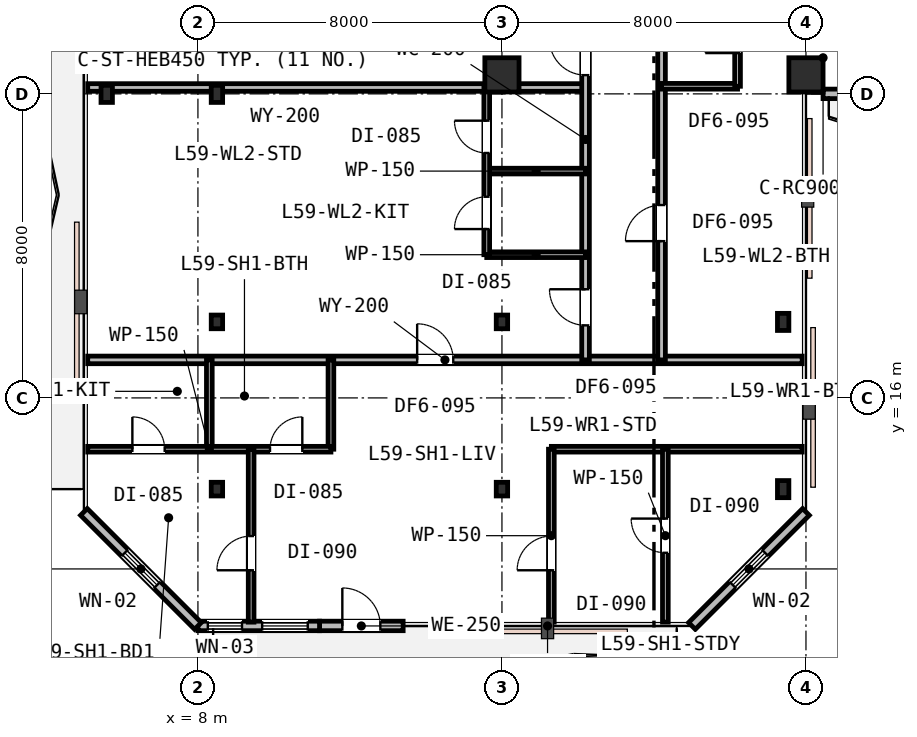
"""IFC4 building model, lengths in metres.
Left out: names, types, materials, properties, quantities, classifications, styles, units other than length and angle.
Written with IfcOpenShell. Run it as: python <this file> out.ifc"""

import sys

from ifc_helpers import new_model, si_unit, direction, frame, frame_2d, origin, origin_2d, place, context, subcontext, project, spatial, rectangle, i_section, extrude, element, fill, save


model = new_model("IFC4")
c1 = context("Model", 3, precision=1e-05, world=origin(), true_north=direction((0.0, 1.0)))
c2 = subcontext(c1, "Body", "Model", "MODEL_VIEW")
j1 = project(units=[si_unit("LENGTHUNIT", "METRE"), si_unit("PLANEANGLEUNIT", "RADIAN")], contexts=[c1])
p1 = place(None, origin())
s1 = spatial("IfcSite", under=j1, at=p1, CompositionType="ELEMENT")
p2 = place(p1, origin())
s2 = spatial("IfcBuilding", under=s1, at=p2, CompositionType="ELEMENT")
p3 = place(p2, frame((0.0, 0.0, 229.8)))
s3 = spatial("IfcBuildingStorey", under=s2, at=p3, CompositionType="ELEMENT", Elevation=229.8)
p4 = place(p3, frame((8.5, 24.0, 0.0), z_axis=(0.0, 0.0, 1.0), x_axis=(1.0, 0.0, 0.0)))
e1 = element("IfcColumn", 1, at=p4, inside=s3, PredefinedType="COLUMN", context=c2, shape_type="SweptSolid", body=[
    extrude(i_section(OverallWidth=0.3, OverallDepth=0.45, WebThickness=0.014, FlangeThickness=0.026, FilletRadius=0.027, at=origin_2d()), origin(), (0.0, 0.0, 1.0), 3.8),
])
for number, where, z_axis, x_axis in (
    (2, (16.0, 24.5, 0.0), (0.0, 0.0, 1.0), (1.0, 0.0, 0.0)),
    (3, (24.0, 24.5, 0.0), (0.0, 0.0, 1.0), (1.0, 0.0, 0.0)),
):
    element("IfcColumn", number, at=place(p3, frame(where, z_axis=z_axis, x_axis=x_axis)), inside=s3, PredefinedType="COLUMN", context=c2, shape_type="SweptSolid", body=[
        extrude(rectangle(XDim=0.9, YDim=0.9, at=origin_2d()), origin(), (0.0, 0.0, 1.0), 3.8),
    ])
for number, where, z_axis, x_axis in (
    (4, (5.6, 24.0, 0.0), (0.0, 0.0, 1.0), (1.0, 0.0, 0.0)),
    (5, (23.4, 13.6, 0.0), (0.0, 0.0, 1.0), (1.0, 0.0, 0.0)),
    (6, (23.4, 18.0, 0.0), (0.0, 0.0, 1.0), (1.0, 0.0, 0.0)),
):
    element("IfcColumn", number, at=place(p3, frame(where, z_axis=z_axis, x_axis=x_axis)), inside=s3, PredefinedType="COLUMN", context=c2, shape_type="SweptSolid", body=[
        extrude(i_section(OverallWidth=0.3, OverallDepth=0.45, WebThickness=0.014, FlangeThickness=0.026, FilletRadius=0.027, at=origin_2d()), origin(), (0.0, 0.0, 1.0), 3.8),
    ])
for number, where, z_axis, x_axis in (
    (7, (8.5, 13.6, 0.0), (0.0, 0.0, 1.0), (1.0, 0.0, 0.0)),
    (8, (16.0, 13.6, 0.0), (0.0, 0.0, 1.0), (1.0, 0.0, 0.0)),
    (9, (8.5, 18.0, 0.0), (0.0, 0.0, 1.0), (1.0, 0.0, 0.0)),
    (10, (16.0, 18.0, 0.0), (0.0, 0.0, 1.0), (1.0, 0.0, 0.0)),
):
    element("IfcColumn", number, at=place(p3, frame(where, z_axis=z_axis, x_axis=x_axis)), inside=s3, PredefinedType="COLUMN", context=c2, shape_type="SweptSolid", body=[
        extrude(i_section(OverallWidth=0.3, OverallDepth=0.36, WebThickness=0.013, FlangeThickness=0.022, FilletRadius=0.027, at=origin_2d()), origin(), (0.0, 0.0, 1.0), 3.8),
    ])
p5 = place(p3, frame((11.2, 10.0, 0.0), z_axis=(0.0, 0.0, 1.0), x_axis=(1.0, 0.0, 0.0)))
e11 = element("IfcWall", 11, at=p5, inside=s3, PredefinedType="STANDARD", context=c2, shape_type="SweptSolid", body=[
    extrude(rectangle(XDim=2.2, YDim=0.25, at=frame_2d((1.1, 0.0))), origin(), (0.0, 0.0, 1.0), 3.53),
])
p6 = place(p5, frame((0.6, 0.0, 0.0)))
e12 = element("IfcOpeningElement", 12, at=p6, cuts=e11, PredefinedType="OPENING", context=c2, shape_type="SweptSolid", body=[
    extrude(rectangle(XDim=1.0, YDim=2.15, at=frame_2d((0.5, 1.075))), frame((0.0, 0.135, 0.0), z_axis=(0.0, -1.0, 0.0), x_axis=(1.0, 0.0, 0.0)), (0.0, 0.0, 1.0), 0.27),
])
p7 = place(p3, frame((8.0, 10.0, 0.0), z_axis=(0.0, 0.0, 1.0), x_axis=(1.0, 0.0, 0.0)))
e13 = element("IfcWall", 13, at=p7, inside=s3, PredefinedType="STANDARD", context=c2, shape_type="SweptSolid", body=[
    extrude(rectangle(XDim=3.2, YDim=0.25, at=frame_2d((1.6, 0.0))), origin(), (0.0, 0.0, 1.0), 3.53),
])
p8 = place(p7, frame((0.26, 0.0, 0.9)))
e14 = element("IfcOpeningElement", 14, at=p8, cuts=e13, PredefinedType="OPENING", context=c2, shape_type="SweptSolid", body=[
    extrude(rectangle(XDim=0.9, YDim=1.55, at=frame_2d((0.45, 0.775))), frame((0.0, 0.135, 0.0), z_axis=(0.0, -1.0, 0.0), x_axis=(1.0, 0.0, 0.0)), (0.0, 0.0, 1.0), 0.27),
])
p9 = place(p7, frame((1.69, 0.0, 0.85)))
e15 = element("IfcOpeningElement", 15, at=p9, cuts=e13, PredefinedType="OPENING", context=c2, shape_type="SweptSolid", body=[
    extrude(rectangle(XDim=1.2, YDim=1.6, at=frame_2d((0.6, 0.8))), frame((0.0, 0.135, 0.0), z_axis=(0.0, -1.0, 0.0), x_axis=(1.0, 0.0, 0.0)), (0.0, 0.0, 1.0), 0.27),
])
p10 = place(p3, frame((21.0, 10.0, 0.0), z_axis=(0.0, 0.0, 1.0), x_axis=(0.707106781187, 0.707106781187, 0.0)))
e16 = element("IfcWall", 16, at=p10, inside=s3, PredefinedType="STANDARD", context=c2, shape_type="SweptSolid", body=[
    extrude(rectangle(XDim=4.243, YDim=0.25, at=frame_2d((2.121, 0.0))), origin(), (0.0, 0.0, 1.0), 3.53),
])
p11 = place(p10, frame((1.521, 0.0, 0.85)))
e17 = element("IfcOpeningElement", 17, at=p11, cuts=e16, PredefinedType="OPENING", context=c2, shape_type="SweptSolid", body=[
    extrude(rectangle(XDim=1.2, YDim=1.6, at=frame_2d((0.6, 0.8))), frame((0.0, 0.135, 0.0), z_axis=(0.0, -1.0, 0.0), x_axis=(1.0, 0.0, 0.0)), (0.0, 0.0, 1.0), 0.27),
])
p12 = place(p3, frame((24.45, 24.0, 0.0), z_axis=(0.0, 0.0, 1.0), x_axis=(1.0, 0.0, 0.0)))
e18 = element("IfcWall", 18, at=p12, inside=s3, PredefinedType="STANDARD", context=c2, shape_type="SweptSolid", body=[
    extrude(rectangle(XDim=0.95, YDim=0.25, at=frame_2d((0.475, 0.0))), origin(), (0.0, 0.0, 1.0), 3.24),
])
p13 = place(p3, frame((5.0, 13.0, 0.0), z_axis=(0.0, 0.0, 1.0), x_axis=(0.707106781187, -0.707106781187, 0.0)))
e19 = element("IfcWall", 19, at=p13, inside=s3, PredefinedType="STANDARD", context=c2, shape_type="SweptSolid", body=[
    extrude(rectangle(XDim=4.243, YDim=0.25, at=frame_2d((2.121, 0.0))), origin(), (0.0, 0.0, 1.0), 3.53),
])
p14 = place(p13, frame((1.521, 0.0, 0.85)))
e20 = element("IfcOpeningElement", 20, at=p14, cuts=e19, PredefinedType="OPENING", context=c2, shape_type="SweptSolid", body=[
    extrude(rectangle(XDim=1.2, YDim=1.6, at=frame_2d((0.6, 0.8))), frame((0.0, 0.135, 0.0), z_axis=(0.0, -1.0, 0.0), x_axis=(1.0, 0.0, 0.0)), (0.0, 0.0, 1.0), 0.27),
])
p15 = place(p3, frame((5.1, 17.0, 0.0), z_axis=(0.0, 0.0, 1.0), x_axis=(1.0, 0.0, 0.0)))
e21 = element("IfcWall", 21, at=p15, inside=s3, PredefinedType="PARTITIONING", context=c2, shape_type="SweptSolid", body=[
    extrude(rectangle(XDim=18.8, YDim=0.2, at=frame_2d((9.4, 0.0))), origin(), (0.0, 0.0, 1.0), 2.92),
])
p16 = place(p15, frame((8.668, 0.0, 0.0)))
e22 = element("IfcOpeningElement", 22, at=p16, cuts=e21, PredefinedType="OPENING", context=c2, shape_type="SweptSolid", body=[
    extrude(rectangle(XDim=0.95, YDim=2.15, at=frame_2d((0.475, 1.075))), frame((0.0, 0.11, 0.0), z_axis=(0.0, -1.0, 0.0), x_axis=(1.0, 0.0, 0.0)), (0.0, 0.0, 1.0), 0.22),
])
p17 = place(p3, frame((5.1, 24.168, 0.0), z_axis=(0.0, 0.0, 1.0), x_axis=(1.0, 0.0, 0.0)))
e23 = element("IfcWall", 23, at=p17, inside=s3, PredefinedType="PARTITIONING", context=c2, shape_type="SweptSolid", body=[
    extrude(rectangle(XDim=13.1, YDim=0.2, at=frame_2d((6.55, 0.0))), origin(), (0.0, 0.0, 1.0), 2.92),
])
p18 = place(p3, frame((18.2, 17.0, 0.0), z_axis=(0.0, 0.0, 1.0), x_axis=(0.0, 1.0, 0.0)))
e24 = element("IfcWall", 24, at=p18, inside=s3, PredefinedType="PARTITIONING", context=c2, shape_type="SweptSolid", body=[
    extrude(rectangle(XDim=11.6, YDim=0.2, at=frame_2d((5.8, 0.0))), origin(), (0.0, 0.0, 1.0), 2.92),
])
p19 = place(p18, frame((7.493, 0.0, 0.0)))
e25 = element("IfcOpeningElement", 25, at=p19, cuts=e24, PredefinedType="OPENING", context=c2, shape_type="SweptSolid", body=[
    extrude(rectangle(XDim=0.95, YDim=2.15, at=frame_2d((0.475, 1.075))), frame((0.0, 0.11, 0.0), z_axis=(0.0, -1.0, 0.0), x_axis=(1.0, 0.0, 0.0)), (0.0, 0.0, 1.0), 0.22),
])
p20 = place(p18, frame((0.909, 0.0, 0.0)))
e26 = element("IfcOpeningElement", 26, at=p20, cuts=e24, PredefinedType="OPENING", context=c2, shape_type="SweptSolid", body=[
    extrude(rectangle(XDim=0.95, YDim=2.15, at=frame_2d((0.475, 1.075))), frame((0.0, 0.11, 0.0), z_axis=(0.0, -1.0, 0.0), x_axis=(1.0, 0.0, 0.0)), (0.0, 0.0, 1.0), 0.22),
])
for number, where, z_axis, x_axis in (
    (27, (15.6, 19.768, 0.0), (0.0, 0.0, 1.0), (1.0, 0.0, 0.0)),
    (28, (15.6, 21.968, 0.0), (0.0, 0.0, 1.0), (1.0, 0.0, 0.0)),
):
    element("IfcWall", number, at=place(p3, frame(where, z_axis=z_axis, x_axis=x_axis)), inside=s3, PredefinedType="PARTITIONING", context=c2, shape_type="SweptSolid", body=[
        extrude(rectangle(XDim=2.6, YDim=0.15, at=frame_2d((1.3, 0.0))), origin(), (0.0, 0.0, 1.0), 2.92),
    ])
p21 = place(p3, frame((15.6, 19.768, 0.0), z_axis=(0.0, 0.0, 1.0), x_axis=(0.0, 1.0, 0.0)))
e29 = element("IfcWall", 29, at=p21, inside=s3, PredefinedType="PARTITIONING", context=c2, shape_type="SweptSolid", body=[
    extrude(rectangle(XDim=4.4, YDim=0.15, at=frame_2d((2.2, 0.0))), origin(), (0.0, 0.0, 1.0), 2.92),
])
p22 = place(p21, frame((0.675, 0.0, 0.0)))
e30 = element("IfcOpeningElement", 30, at=p22, cuts=e29, PredefinedType="OPENING", context=c2, shape_type="SweptSolid", body=[
    extrude(rectangle(XDim=0.85, YDim=2.15, at=frame_2d((0.425, 1.075))), frame((0.0, 0.085, 0.0), z_axis=(0.0, -1.0, 0.0), x_axis=(1.0, 0.0, 0.0)), (0.0, 0.0, 1.0), 0.17),
])
p23 = place(p21, frame((2.677, 0.0, 0.0)))
e31 = element("IfcOpeningElement", 31, at=p23, cuts=e29, PredefinedType="OPENING", context=c2, shape_type="SweptSolid", body=[
    extrude(rectangle(XDim=0.85, YDim=2.15, at=frame_2d((0.425, 1.075))), frame((0.0, 0.085, 0.0), z_axis=(0.0, -1.0, 0.0), x_axis=(1.0, 0.0, 0.0)), (0.0, 0.0, 1.0), 0.17),
])
p24 = place(p3, frame((20.2, 17.0, 0.0), z_axis=(0.0, 0.0, 1.0), x_axis=(0.0, 1.0, 0.0)))
e32 = element("IfcWall", 32, at=p24, inside=s3, PredefinedType="PARTITIONING", context=c2, shape_type="SweptSolid", body=[
    extrude(rectangle(XDim=11.6, YDim=0.2, at=frame_2d((5.8, 0.0))), origin(), (0.0, 0.0, 1.0), 2.92),
])
p25 = place(p24, frame((3.125, 0.0, 0.0)))
e33 = element("IfcOpeningElement", 33, at=p25, cuts=e32, PredefinedType="OPENING", context=c2, shape_type="SweptSolid", body=[
    extrude(rectangle(XDim=0.95, YDim=2.15, at=frame_2d((0.475, 1.075))), frame((0.0, 0.11, 0.0), z_axis=(0.0, -1.0, 0.0), x_axis=(1.0, 0.0, 0.0)), (0.0, 0.0, 1.0), 0.22),
])
p26 = place(p3, frame((20.2, 24.2, 0.0), z_axis=(0.0, 0.0, 1.0), x_axis=(1.0, 0.0, 0.0)))
e34 = element("IfcWall", 34, at=p26, inside=s3, PredefinedType="PARTITIONING", context=c2, shape_type="SweptSolid", body=[
    extrude(rectangle(XDim=2.0, YDim=0.15, at=frame_2d((1.0, 0.0))), origin(), (0.0, 0.0, 1.0), 2.92),
])
p27 = place(p3, frame((22.2, 24.2, 0.0), z_axis=(0.0, 0.0, 1.0), x_axis=(0.0, 1.0, 0.0)))
e35 = element("IfcWall", 35, at=p27, inside=s3, PredefinedType="PARTITIONING", context=c2, shape_type="SweptSolid", body=[
    extrude(rectangle(XDim=4.4, YDim=0.15, at=frame_2d((2.2, 0.0))), origin(), (0.0, 0.0, 1.0), 2.92),
])
p28 = place(p27, frame((0.873, 0.0, 0.0)))
e36 = element("IfcOpeningElement", 36, at=p28, cuts=e35, PredefinedType="OPENING", context=c2, shape_type="SweptSolid", body=[
    extrude(rectangle(XDim=0.85, YDim=2.15, at=frame_2d((0.425, 1.075))), frame((0.0, 0.085, 0.0), z_axis=(0.0, -1.0, 0.0), x_axis=(1.0, 0.0, 0.0)), (0.0, 0.0, 1.0), 0.17),
])
p29 = place(p27, frame((2.875, 0.0, 0.0)))
e37 = element("IfcOpeningElement", 37, at=p29, cuts=e35, PredefinedType="OPENING", context=c2, shape_type="SweptSolid", body=[
    extrude(rectangle(XDim=0.85, YDim=2.15, at=frame_2d((0.425, 1.075))), frame((0.0, 0.085, 0.0), z_axis=(0.0, -1.0, 0.0), x_axis=(1.0, 0.0, 0.0)), (0.0, 0.0, 1.0), 0.17),
])
p30 = place(p3, frame((11.5, 14.65, 0.0), z_axis=(0.0, 0.0, 1.0), x_axis=(0.0, 1.0, 0.0)))
e38 = element("IfcWall", 38, at=p30, inside=s3, PredefinedType="PARTITIONING", context=c2, shape_type="SweptSolid", body=[
    extrude(rectangle(XDim=2.35, YDim=0.15, at=frame_2d((1.175, 0.0))), origin(), (0.0, 0.0, 1.0), 3.22),
])
p31 = place(p3, frame((8.3, 14.65, 0.0), z_axis=(0.0, 0.0, 1.0), x_axis=(0.0, 1.0, 0.0)))
e39 = element("IfcWall", 39, at=p31, inside=s3, PredefinedType="PARTITIONING", context=c2, shape_type="SweptSolid", body=[
    extrude(rectangle(XDim=2.35, YDim=0.15, at=frame_2d((1.175, 0.0))), origin(), (0.0, 0.0, 1.0), 2.92),
])
p32 = place(p3, frame((5.1, 14.65, 0.0), z_axis=(0.0, 0.0, 1.0), x_axis=(1.0, 0.0, 0.0)))
e40 = element("IfcWall", 40, at=p32, inside=s3, PredefinedType="PARTITIONING", context=c2, shape_type="SweptSolid", body=[
    extrude(rectangle(XDim=6.4, YDim=0.15, at=frame_2d((3.2, 0.0))), origin(), (0.0, 0.0, 1.0), 2.92),
])
p33 = place(p32, frame((1.175, 0.0, 0.0)))
e41 = element("IfcOpeningElement", 41, at=p33, cuts=e40, PredefinedType="OPENING", context=c2, shape_type="SweptSolid", body=[
    extrude(rectangle(XDim=0.85, YDim=2.15, at=frame_2d((0.425, 1.075))), frame((0.0, 0.085, 0.0), z_axis=(0.0, -1.0, 0.0), x_axis=(1.0, 0.0, 0.0)), (0.0, 0.0, 1.0), 0.17),
])
p34 = place(p32, frame((4.797, 0.0, 0.0)))
e42 = element("IfcOpeningElement", 42, at=p34, cuts=e40, PredefinedType="OPENING", context=c2, shape_type="SweptSolid", body=[
    extrude(rectangle(XDim=0.85, YDim=2.15, at=frame_2d((0.425, 1.075))), frame((0.0, 0.085, 0.0), z_axis=(0.0, -1.0, 0.0), x_axis=(1.0, 0.0, 0.0)), (0.0, 0.0, 1.0), 0.17),
])
p35 = place(p3, frame((17.3, 14.65, 0.0), z_axis=(0.0, 0.0, 1.0), x_axis=(1.0, 0.0, 0.0)))
e43 = element("IfcWall", 43, at=p35, inside=s3, PredefinedType="PARTITIONING", context=c2, shape_type="SweptSolid", body=[
    extrude(rectangle(XDim=6.6, YDim=0.15, at=frame_2d((3.3, 0.0))), origin(), (0.0, 0.0, 1.0), 3.22),
])
p36 = place(p3, frame((9.4, 10.1, 0.0), z_axis=(0.0, 0.0, 1.0), x_axis=(0.0, 1.0, 0.0)))
e44 = element("IfcWall", 44, at=p36, inside=s3, PredefinedType="PARTITIONING", context=c2, shape_type="SweptSolid", body=[
    extrude(rectangle(XDim=4.55, YDim=0.15, at=frame_2d((2.275, 0.0))), origin(), (0.0, 0.0, 1.0), 2.92),
])
p37 = place(p36, frame((1.365, 0.0, 0.0)))
e45 = element("IfcOpeningElement", 45, at=p37, cuts=e44, PredefinedType="OPENING", context=c2, shape_type="SweptSolid", body=[
    extrude(rectangle(XDim=0.9, YDim=2.15, at=frame_2d((0.45, 1.075))), frame((0.0, 0.085, 0.0), z_axis=(0.0, -1.0, 0.0), x_axis=(1.0, 0.0, 0.0)), (0.0, 0.0, 1.0), 0.17),
])
p38 = place(p3, frame((20.3, 10.1, 0.0), z_axis=(0.0, 0.0, 1.0), x_axis=(0.0, 1.0, 0.0)))
e46 = element("IfcWall", 46, at=p38, inside=s3, PredefinedType="PARTITIONING", context=c2, shape_type="SweptSolid", body=[
    extrude(rectangle(XDim=4.55, YDim=0.15, at=frame_2d((2.275, 0.0))), origin(), (0.0, 0.0, 1.0), 2.92),
])
p39 = place(p38, frame((1.825, 0.0, 0.0)))
e47 = element("IfcOpeningElement", 47, at=p39, cuts=e46, PredefinedType="OPENING", context=c2, shape_type="SweptSolid", body=[
    extrude(rectangle(XDim=0.9, YDim=2.15, at=frame_2d((0.45, 1.075))), frame((0.0, 0.085, 0.0), z_axis=(0.0, -1.0, 0.0), x_axis=(1.0, 0.0, 0.0)), (0.0, 0.0, 1.0), 0.17),
])
p40 = place(p3, frame((17.3, 10.1, 0.0), z_axis=(0.0, 0.0, 1.0), x_axis=(0.0, 1.0, 0.0)))
e48 = element("IfcWall", 48, at=p40, inside=s3, PredefinedType="PARTITIONING", context=c2, shape_type="SweptSolid", body=[
    extrude(rectangle(XDim=4.55, YDim=0.15, at=frame_2d((2.275, 0.0))), origin(), (0.0, 0.0, 1.0), 2.92),
])
p41 = place(p40, frame((1.365, 0.0, 0.0)))
e49 = element("IfcOpeningElement", 49, at=p41, cuts=e48, PredefinedType="OPENING", context=c2, shape_type="SweptSolid", body=[
    extrude(rectangle(XDim=0.9, YDim=2.15, at=frame_2d((0.45, 1.075))), frame((0.0, 0.085, 0.0), z_axis=(0.0, -1.0, 0.0), x_axis=(1.0, 0.0, 0.0)), (0.0, 0.0, 1.0), 0.17),
])
p42 = place(p6, origin())
e50 = element("IfcDoor", 50, at=p42, inside=s3, OperationType="SINGLE_SWING_LEFT", PredefinedType="DOOR", context=c2, shape_type="SweptSolid", body=[
    extrude(rectangle(XDim=1.0, YDim=2.15, at=frame_2d((0.5, 1.075))), frame((0.0, 0.025, 0.0), z_axis=(0.0, -1.0, 0.0), x_axis=(1.0, 0.0, 0.0)), (0.0, 0.0, 1.0), 0.05),
])
fill(e12, e50)
p43 = place(p8, origin())
e51 = element("IfcWindow", 51, at=p43, inside=s3, PartitioningType="SINGLE_PANEL", PredefinedType="WINDOW", context=c2, shape_type="SweptSolid", body=[
    extrude(rectangle(XDim=0.9, YDim=1.55, at=frame_2d((0.45, 0.775))), frame((0.0, 0.03, 0.0), z_axis=(0.0, -1.0, 0.0), x_axis=(1.0, 0.0, 0.0)), (0.0, 0.0, 1.0), 0.06),
])
fill(e14, e51)
p44 = place(p9, origin())
e52 = element("IfcWindow", 52, at=p44, inside=s3, PartitioningType="SINGLE_PANEL", PredefinedType="WINDOW", context=c2, shape_type="SweptSolid", body=[
    extrude(rectangle(XDim=1.2, YDim=1.6, at=frame_2d((0.6, 0.8))), frame((0.0, 0.03, 0.0), z_axis=(0.0, -1.0, 0.0), x_axis=(1.0, 0.0, 0.0)), (0.0, 0.0, 1.0), 0.06),
])
fill(e15, e52)
p45 = place(p11, origin())
e53 = element("IfcWindow", 53, at=p45, inside=s3, PartitioningType="SINGLE_PANEL", PredefinedType="WINDOW", context=c2, shape_type="SweptSolid", body=[
    extrude(rectangle(XDim=1.2, YDim=1.6, at=frame_2d((0.6, 0.8))), frame((0.0, 0.03, 0.0), z_axis=(0.0, -1.0, 0.0), x_axis=(1.0, 0.0, 0.0)), (0.0, 0.0, 1.0), 0.06),
])
fill(e17, e53)
p46 = place(p14, origin())
e54 = element("IfcWindow", 54, at=p46, inside=s3, PartitioningType="SINGLE_PANEL", PredefinedType="WINDOW", context=c2, shape_type="SweptSolid", body=[
    extrude(rectangle(XDim=1.2, YDim=1.6, at=frame_2d((0.6, 0.8))), frame((0.0, 0.03, 0.0), z_axis=(0.0, -1.0, 0.0), x_axis=(1.0, 0.0, 0.0)), (0.0, 0.0, 1.0), 0.06),
])
fill(e20, e54)
p47 = place(p19, origin())
e55 = element("IfcDoor", 55, at=p47, inside=s3, OperationType="SINGLE_SWING_RIGHT", PredefinedType="DOOR", context=c2, shape_type="SweptSolid", body=[
    extrude(rectangle(XDim=0.95, YDim=2.15, at=frame_2d((0.475, 1.075))), frame((0.0, 0.025, 0.0), z_axis=(0.0, -1.0, 0.0), x_axis=(1.0, 0.0, 0.0)), (0.0, 0.0, 1.0), 0.05),
])
fill(e25, e55)
p48 = place(p20, origin())
e56 = element("IfcDoor", 56, at=p48, inside=s3, OperationType="SINGLE_SWING_RIGHT", PredefinedType="DOOR", context=c2, shape_type="SweptSolid", body=[
    extrude(rectangle(XDim=0.95, YDim=2.15, at=frame_2d((0.475, 1.075))), frame((0.0, 0.025, 0.0), z_axis=(0.0, -1.0, 0.0), x_axis=(1.0, 0.0, 0.0)), (0.0, 0.0, 1.0), 0.05),
])
fill(e26, e56)
p49 = place(p22, origin())
e57 = element("IfcDoor", 57, at=p49, inside=s3, OperationType="SINGLE_SWING_LEFT", PredefinedType="DOOR", context=c2, shape_type="SweptSolid", body=[
    extrude(rectangle(XDim=0.85, YDim=2.15, at=frame_2d((0.425, 1.075))), frame((0.0, 0.025, 0.0), z_axis=(0.0, -1.0, 0.0), x_axis=(1.0, 0.0, 0.0)), (0.0, 0.0, 1.0), 0.05),
])
fill(e30, e57)
p50 = place(p23, origin())
e58 = element("IfcDoor", 58, at=p50, inside=s3, OperationType="SINGLE_SWING_RIGHT", PredefinedType="DOOR", context=c2, shape_type="SweptSolid", body=[
    extrude(rectangle(XDim=0.85, YDim=2.15, at=frame_2d((0.425, 1.075))), frame((0.0, 0.025, 0.0), z_axis=(0.0, -1.0, 0.0), x_axis=(1.0, 0.0, 0.0)), (0.0, 0.0, 1.0), 0.05),
])
fill(e31, e58)
p51 = place(p25, origin())
e59 = element("IfcDoor", 59, at=p51, inside=s3, OperationType="SINGLE_SWING_LEFT", PredefinedType="DOOR", context=c2, shape_type="SweptSolid", body=[
    extrude(rectangle(XDim=0.95, YDim=2.15, at=frame_2d((0.475, 1.075))), frame((0.0, 0.025, 0.0), z_axis=(0.0, -1.0, 0.0), x_axis=(1.0, 0.0, 0.0)), (0.0, 0.0, 1.0), 0.05),
])
fill(e33, e59)
p52 = place(p28, origin())
e60 = element("IfcDoor", 60, at=p52, inside=s3, OperationType="SINGLE_SWING_LEFT", PredefinedType="DOOR", context=c2, shape_type="SweptSolid", body=[
    extrude(rectangle(XDim=0.85, YDim=2.15, at=frame_2d((0.425, 1.075))), frame((0.0, 0.025, 0.0), z_axis=(0.0, -1.0, 0.0), x_axis=(1.0, 0.0, 0.0)), (0.0, 0.0, 1.0), 0.05),
])
fill(e36, e60)
p53 = place(p16, origin())
e61 = element("IfcDoor", 61, at=p53, inside=s3, OperationType="SINGLE_SWING_LEFT", PredefinedType="DOOR", context=c2, shape_type="SweptSolid", body=[
    extrude(rectangle(XDim=0.95, YDim=2.15, at=frame_2d((0.475, 1.075))), frame((0.0, 0.025, 0.0), z_axis=(0.0, -1.0, 0.0), x_axis=(1.0, 0.0, 0.0)), (0.0, 0.0, 1.0), 0.05),
])
fill(e22, e61)
p54 = place(p33, origin())
e62 = element("IfcDoor", 62, at=p54, inside=s3, OperationType="SINGLE_SWING_LEFT", PredefinedType="DOOR", context=c2, shape_type="SweptSolid", body=[
    extrude(rectangle(XDim=0.85, YDim=2.15, at=frame_2d((0.425, 1.075))), frame((0.0, 0.025, 0.0), z_axis=(0.0, -1.0, 0.0), x_axis=(1.0, 0.0, 0.0)), (0.0, 0.0, 1.0), 0.05),
])
fill(e41, e62)
p55 = place(p34, origin())
e63 = element("IfcDoor", 63, at=p55, inside=s3, OperationType="SINGLE_SWING_RIGHT", PredefinedType="DOOR", context=c2, shape_type="SweptSolid", body=[
    extrude(rectangle(XDim=0.85, YDim=2.15, at=frame_2d((0.425, 1.075))), frame((0.0, 0.025, 0.0), z_axis=(0.0, -1.0, 0.0), x_axis=(1.0, 0.0, 0.0)), (0.0, 0.0, 1.0), 0.05),
])
fill(e42, e63)
p56 = place(p37, origin())
e64 = element("IfcDoor", 64, at=p56, inside=s3, OperationType="SINGLE_SWING_LEFT", PredefinedType="DOOR", context=c2, shape_type="SweptSolid", body=[
    extrude(rectangle(XDim=0.9, YDim=2.15, at=frame_2d((0.45, 1.075))), frame((0.0, 0.025, 0.0), z_axis=(0.0, -1.0, 0.0), x_axis=(1.0, 0.0, 0.0)), (0.0, 0.0, 1.0), 0.05),
])
fill(e45, e64)
p57 = place(p39, origin())
e65 = element("IfcDoor", 65, at=p57, inside=s3, OperationType="SINGLE_SWING_RIGHT", PredefinedType="DOOR", context=c2, shape_type="SweptSolid", body=[
    extrude(rectangle(XDim=0.9, YDim=2.15, at=frame_2d((0.45, 1.075))), frame((0.0, 0.025, 0.0), z_axis=(0.0, -1.0, 0.0), x_axis=(1.0, 0.0, 0.0)), (0.0, 0.0, 1.0), 0.05),
])
fill(e47, e65)
p58 = place(p41, origin())
e66 = element("IfcDoor", 66, at=p58, inside=s3, OperationType="SINGLE_SWING_LEFT", PredefinedType="DOOR", context=c2, shape_type="SweptSolid", body=[
    extrude(rectangle(XDim=0.9, YDim=2.15, at=frame_2d((0.45, 1.075))), frame((0.0, 0.025, 0.0), z_axis=(0.0, -1.0, 0.0), x_axis=(1.0, 0.0, 0.0)), (0.0, 0.0, 1.0), 0.05),
])
fill(e49, e66)
save(model, sys.argv[1])
